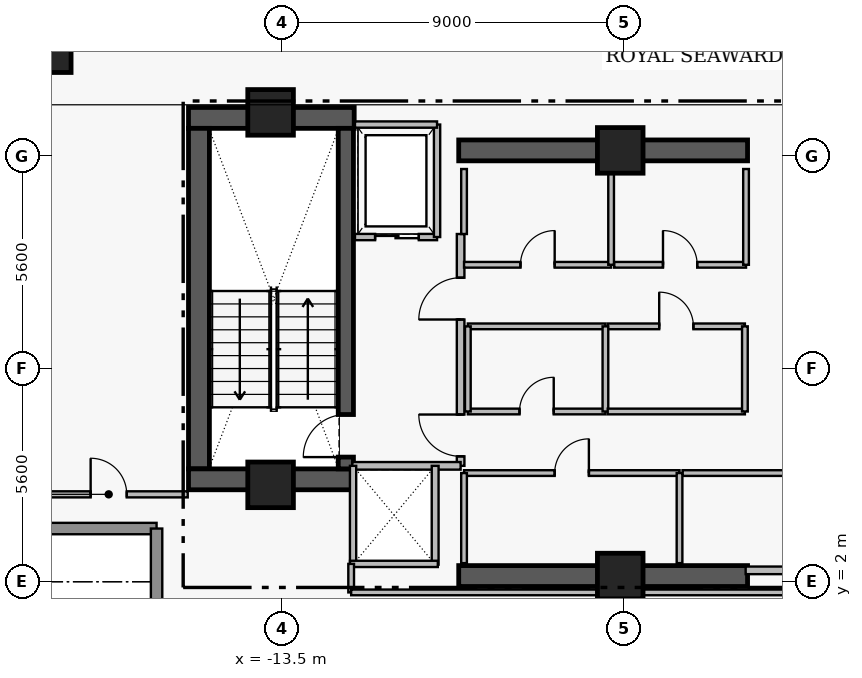
"""IFC4 building model, lengths in metres.
Left out: names, types, materials, properties, quantities, classifications, styles, units other than length and angle.
Written with IfcOpenShell. Run it as: python <this file> out.ifc"""

import sys

from ifc_helpers import new_model, si_unit, direction, frame, frame_2d, origin, origin_2d, place, context, subcontext, project, spatial, rectangle, extrude, element, fill, save


model = new_model("IFC4")
c1 = context("Model", 3, precision=1e-05, world=origin(), true_north=direction((0.0, 1.0)))
c2 = subcontext(c1, "Body", "Model", "MODEL_VIEW")
j1 = project(units=[si_unit("LENGTHUNIT", "METRE"), si_unit("PLANEANGLEUNIT", "RADIAN")], contexts=[c1])
p1 = place(None, origin())
s1 = spatial("IfcSite", under=j1, at=p1, CompositionType="ELEMENT")
p2 = place(p1, origin())
s2 = spatial("IfcBuilding", under=s1, at=p2, CompositionType="ELEMENT")
p3 = place(p2, frame((0.0, 0.0, 265.55)))
s3 = spatial("IfcBuildingStorey", under=s2, at=p3, CompositionType="ELEMENT", Elevation=265.55)
p4 = place(p3, frame((-15.96, 14.205, 0.0), z_axis=(0.0, 0.0, 1.0), x_axis=(1.0, 0.0, 0.0)))
e1 = element("IfcWall", 1, at=p4, inside=s3, PredefinedType="SHEAR", context=c2, shape_type="SweptSolid", body=[
    extrude(rectangle(XDim=4.36, YDim=0.55, at=frame_2d((2.18, 0.0))), origin(), (0.0, 0.0, 1.0), 3.51),
])
p5 = place(p3, frame((-15.685, 4.97, 0.0), z_axis=(0.0, 0.0, 1.0), x_axis=(0.0, 1.0, 0.0)))
e2 = element("IfcWall", 2, at=p5, inside=s3, PredefinedType="SHEAR", context=c2, shape_type="SweptSolid", body=[
    extrude(rectangle(XDim=8.96, YDim=0.55, at=frame_2d((4.48, 0.0))), origin(), (0.0, 0.0, 1.0), 3.51),
])
p6 = place(p3, frame((-15.96, 4.695, 0.0), z_axis=(0.0, 0.0, 1.0), x_axis=(1.0, 0.0, 0.0)))
e3 = element("IfcWall", 3, at=p6, inside=s3, PredefinedType="SHEAR", context=c2, shape_type="SweptSolid", body=[
    extrude(rectangle(XDim=4.36, YDim=0.55, at=frame_2d((2.18, 0.0))), origin(), (0.0, 0.0, 1.0), 3.51),
])
for number, where, z_axis, x_axis in (
    (4, (-8.85, 2.15, 0.0), (0.0, 0.0, 1.0), (1.0, 0.0, 0.0)),
    (5, (-8.85, 13.35, 0.0), (0.0, 0.0, 1.0), (1.0, 0.0, 0.0)),
):
    element("IfcWall", number, at=place(p3, frame(where, z_axis=z_axis, x_axis=x_axis)), inside=s3, PredefinedType="SHEAR", context=c2, shape_type="SweptSolid", body=[
        extrude(rectangle(XDim=7.6, YDim=0.55, at=frame_2d((3.8, 0.0))), origin(), (0.0, 0.0, 1.0), 3.48),
    ])
p7 = place(p3, frame((-11.82, 4.97, 0.0), z_axis=(0.0, 0.0, 1.0), x_axis=(0.0, 1.0, 0.0)))
e6 = element("IfcWall", 6, at=p7, inside=s3, PredefinedType="SHEAR", context=c2, shape_type="SweptSolid", body=[
    extrude(rectangle(XDim=8.96, YDim=0.4, at=frame_2d((4.48, 0.0))), origin(), (0.0, 0.0, 1.0), 3.51),
])
p8 = place(p7, frame((0.31, 0.0, 0.0)))
e7 = element("IfcOpeningElement", 7, at=p8, cuts=e6, PredefinedType="OPENING", context=c2, shape_type="SweptSolid", body=[
    extrude(rectangle(XDim=1.12, YDim=2.22, at=frame_2d((0.56, 1.11))), frame((0.0, 0.21, 0.0), z_axis=(0.0, -1.0, 0.0), x_axis=(1.0, 0.0, 0.0)), (0.0, 0.0, 1.0), 0.42),
])
for number, where, z_axis, x_axis in (
    (8, (-13.8, 14.35, 0.0), (0.0, 0.0, 1.0), (1.0, 0.0, 0.0)),
    (9, (-4.6, 13.35, 0.0), (0.0, 0.0, 1.0), (1.0, 0.0, 0.0)),
    (10, (-13.8, 4.55, 0.0), (0.0, 0.0, 1.0), (1.0, 0.0, 0.0)),
    (11, (-4.6, 2.15, 0.0), (0.0, 0.0, 1.0), (1.0, 0.0, 0.0)),
):
    element("IfcColumn", number, at=place(p3, frame(where, z_axis=z_axis, x_axis=x_axis)), inside=s3, PredefinedType="COLUMN", context=c2, shape_type="SweptSolid", body=[
        extrude(rectangle(XDim=1.2, YDim=1.2, at=origin_2d()), origin(), (0.0, 0.0, 1.0), 3.7),
    ])
p9 = place(p3, frame((-19.55, 15.9, 0.0), z_axis=(0.0, 0.0, 1.0), x_axis=(1.0, 0.0, 0.0)))
e12 = element("IfcColumn", 12, at=p9, inside=s3, PredefinedType="COLUMN", context=c2, shape_type="SweptSolid", body=[
    extrude(rectangle(XDim=1.0, YDim=1.0, at=origin_2d()), origin(), (0.0, 0.0, 1.0), 3.7),
])
for number, where, z_axis, x_axis in (
    (13, (-16.8, 3.4, 0.0), (0.0, 0.0, 1.0), (-1.0, 0.0, 0.0)),
    (14, (-16.8, 0.0, 0.0), (0.0, 0.0, 1.0), (0.0, 1.0, 0.0)),
):
    element("IfcWall", number, at=place(p3, frame(where, z_axis=z_axis, x_axis=x_axis)), inside=s3, PredefinedType="STANDARD", context=c2, shape_type="SweptSolid", body=[
        extrude(rectangle(XDim=3.4, YDim=0.3, at=frame_2d((1.7, 0.0))), origin(), (0.0, 0.0, 1.0), 3.48),
    ])
p10 = place(p3, frame((-8.8, 5.05, 0.0), z_axis=(0.0, 0.0, 1.0), x_axis=(0.0, 1.0, 0.0)))
e15 = element("IfcWall", 15, at=p10, inside=s3, PredefinedType="PARTITIONING", context=c2, shape_type="SweptSolid", body=[
    extrude(rectangle(XDim=6.1, YDim=0.2, at=frame_2d((3.05, 0.0))), origin(), (0.0, 0.0, 1.0), 3.48),
])
p11 = place(p10, frame((0.25, 0.0, 0.0)))
e16 = element("IfcOpeningElement", 16, at=p11, cuts=e15, PredefinedType="OPENING", context=c2, shape_type="SweptSolid", body=[
    extrude(rectangle(XDim=1.1, YDim=2.2, at=frame_2d((0.55, 1.1))), frame((0.0, 0.11, 0.0), z_axis=(0.0, -1.0, 0.0), x_axis=(1.0, 0.0, 0.0)), (0.0, 0.0, 1.0), 0.22),
])
p12 = place(p10, frame((3.85, 0.0, 0.0)))
e17 = element("IfcOpeningElement", 17, at=p12, cuts=e15, PredefinedType="OPENING", context=c2, shape_type="SweptSolid", body=[
    extrude(rectangle(XDim=1.1, YDim=2.2, at=frame_2d((0.55, 1.1))), frame((0.0, 0.11, 0.0), z_axis=(0.0, -1.0, 0.0), x_axis=(1.0, 0.0, 0.0)), (0.0, 0.0, 1.0), 0.22),
])
p13 = place(p3, frame((-11.58, 11.07, 0.0), z_axis=(0.0, 0.0, 1.0), x_axis=(1.0, 0.0, 0.0)))
e18 = element("IfcWall", 18, at=p13, inside=s3, PredefinedType="PARTITIONING", context=c2, shape_type="SweptSolid", body=[
    extrude(rectangle(XDim=2.16, YDim=0.165, at=frame_2d((1.08, 0.0))), origin(), (0.0, 0.0, 1.0), 3.48),
])
p14 = place(p13, frame((0.53, 0.0, 0.0)))
e19 = element("IfcOpeningElement", 19, at=p14, cuts=e18, PredefinedType="OPENING", context=c2, shape_type="SweptSolid", body=[
    extrude(rectangle(XDim=1.15, YDim=2.25, at=frame_2d((0.575, 1.125))), frame((0.0, 0.093, 0.0), z_axis=(0.0, -1.0, 0.0), x_axis=(1.0, 0.0, 0.0)), (0.0, 0.0, 1.0), 0.185),
])
p15 = place(p3, frame((-8.71, 4.86, 0.0), z_axis=(0.0, 0.0, 1.0), x_axis=(1.0, 0.0, 0.0)))
e20 = element("IfcWall", 20, at=p15, inside=s3, PredefinedType="PARTITIONING", context=c2, shape_type="SweptSolid", body=[
    extrude(rectangle(XDim=5.67, YDim=0.15, at=frame_2d((2.835, 0.0))), origin(), (0.0, 0.0, 1.0), 3.48),
])
p16 = place(p15, frame((2.385, 0.0, 0.0)))
e21 = element("IfcOpeningElement", 21, at=p16, cuts=e20, PredefinedType="OPENING", context=c2, shape_type="SweptSolid", body=[
    extrude(rectangle(XDim=0.9, YDim=2.15, at=frame_2d((0.45, 1.075))), frame((0.0, 0.085, 0.0), z_axis=(0.0, -1.0, 0.0), x_axis=(1.0, 0.0, 0.0)), (0.0, 0.0, 1.0), 0.17),
])
p17 = place(p3, frame((-2.96, 4.86, 0.0), z_axis=(0.0, 0.0, 1.0), x_axis=(1.0, 0.0, 0.0)))
e22 = element("IfcWall", 22, at=p17, inside=s3, PredefinedType="PARTITIONING", context=c2, shape_type="SweptSolid", body=[
    extrude(rectangle(XDim=6.67, YDim=0.15, at=frame_2d((3.335, 0.0))), origin(), (0.0, 0.0, 1.0), 3.48),
])
p18 = place(p17, frame((2.885, 0.0, 0.0)))
e23 = element("IfcOpeningElement", 23, at=p18, cuts=e22, PredefinedType="OPENING", context=c2, shape_type="SweptSolid", body=[
    extrude(rectangle(XDim=0.9, YDim=2.15, at=frame_2d((0.45, 1.075))), frame((0.0, 0.085, 0.0), z_axis=(0.0, -1.0, 0.0), x_axis=(1.0, 0.0, 0.0)), (0.0, 0.0, 1.0), 0.17),
])
p19 = place(p3, frame((-8.71, 10.34, 0.0), z_axis=(0.0, 0.0, 1.0), x_axis=(1.0, 0.0, 0.0)))
e24 = element("IfcWall", 24, at=p19, inside=s3, PredefinedType="PARTITIONING", context=c2, shape_type="SweptSolid", body=[
    extrude(rectangle(XDim=3.87, YDim=0.15, at=frame_2d((1.935, 0.0))), origin(), (0.0, 0.0, 1.0), 3.48),
])
p20 = place(p19, frame((1.485, 0.0, 0.0)))
e25 = element("IfcOpeningElement", 25, at=p20, cuts=e24, PredefinedType="OPENING", context=c2, shape_type="SweptSolid", body=[
    extrude(rectangle(XDim=0.9, YDim=2.15, at=frame_2d((0.45, 1.075))), frame((0.0, 0.085, 0.0), z_axis=(0.0, -1.0, 0.0), x_axis=(1.0, 0.0, 0.0)), (0.0, 0.0, 1.0), 0.17),
])
p21 = place(p3, frame((-4.76, 10.34, 0.0), z_axis=(0.0, 0.0, 1.0), x_axis=(1.0, 0.0, 0.0)))
e26 = element("IfcWall", 26, at=p21, inside=s3, PredefinedType="PARTITIONING", context=c2, shape_type="SweptSolid", body=[
    extrude(rectangle(XDim=3.47, YDim=0.15, at=frame_2d((1.735, 0.0))), origin(), (0.0, 0.0, 1.0), 3.48),
])
p22 = place(p21, frame((1.285, 0.0, 0.0)))
e27 = element("IfcOpeningElement", 27, at=p22, cuts=e26, PredefinedType="OPENING", context=c2, shape_type="SweptSolid", body=[
    extrude(rectangle(XDim=0.9, YDim=2.15, at=frame_2d((0.45, 1.075))), frame((0.0, 0.085, 0.0), z_axis=(0.0, -1.0, 0.0), x_axis=(1.0, 0.0, 0.0)), (0.0, 0.0, 1.0), 0.17),
])
p23 = place(p3, frame((-8.61, 6.48, 0.0), z_axis=(0.0, 0.0, 1.0), x_axis=(1.0, 0.0, 0.0)))
e28 = element("IfcWall", 28, at=p23, inside=s3, PredefinedType="PARTITIONING", context=c2, shape_type="SweptSolid", body=[
    extrude(rectangle(XDim=3.62, YDim=0.15, at=frame_2d((1.81, 0.0))), origin(), (0.0, 0.0, 1.0), 3.48),
])
p24 = place(p23, frame((1.36, 0.0, 0.0)))
e29 = element("IfcOpeningElement", 29, at=p24, cuts=e28, PredefinedType="OPENING", context=c2, shape_type="SweptSolid", body=[
    extrude(rectangle(XDim=0.9, YDim=2.15, at=frame_2d((0.45, 1.075))), frame((0.0, 0.085, 0.0), z_axis=(0.0, -1.0, 0.0), x_axis=(1.0, 0.0, 0.0)), (0.0, 0.0, 1.0), 0.17),
])
p25 = place(p3, frame((-4.93, 8.72, 0.0), z_axis=(0.0, 0.0, 1.0), x_axis=(1.0, 0.0, 0.0)))
e30 = element("IfcWall", 30, at=p25, inside=s3, PredefinedType="PARTITIONING", context=c2, shape_type="SweptSolid", body=[
    extrude(rectangle(XDim=3.61, YDim=0.15, at=frame_2d((1.805, 0.0))), origin(), (0.0, 0.0, 1.0), 3.48),
])
p26 = place(p25, frame((1.355, 0.0, 0.0)))
e31 = element("IfcOpeningElement", 31, at=p26, cuts=e30, PredefinedType="OPENING", context=c2, shape_type="SweptSolid", body=[
    extrude(rectangle(XDim=0.9, YDim=2.15, at=frame_2d((0.45, 1.075))), frame((0.0, 0.085, 0.0), z_axis=(0.0, -1.0, 0.0), x_axis=(1.0, 0.0, 0.0)), (0.0, 0.0, 1.0), 0.17),
])
p27 = place(p3, frame((-20.14, 4.3, 0.0), z_axis=(0.0, 0.0, 1.0), x_axis=(1.0, 0.0, 0.0)))
e32 = element("IfcWall", 32, at=p27, inside=s3, PredefinedType="PARTITIONING", context=c2, shape_type="SweptSolid", body=[
    extrude(rectangle(XDim=4.16, YDim=0.16, at=frame_2d((2.08, 0.0))), origin(), (0.0, 0.0, 1.0), 3.48),
])
p28 = place(p27, frame((1.605, 0.0, 0.0)))
e33 = element("IfcOpeningElement", 33, at=p28, cuts=e32, PredefinedType="OPENING", context=c2, shape_type="SweptSolid", body=[
    extrude(rectangle(XDim=0.95, YDim=2.15, at=frame_2d((0.475, 1.075))), frame((0.0, 0.09, 0.0), z_axis=(0.0, -1.0, 0.0), x_axis=(1.0, 0.0, 0.0)), (0.0, 0.0, 1.0), 0.18),
])
p29 = place(p3, frame((-11.65, 5.05, 0.0), z_axis=(0.0, 0.0, 1.0), x_axis=(1.0, 0.0, 0.0)))
e34 = element("IfcWall", 34, at=p29, inside=s3, PredefinedType="PARTITIONING", context=c2, shape_type="SweptSolid", body=[
    extrude(rectangle(XDim=2.85, YDim=0.2, at=frame_2d((1.425, 0.0))), origin(), (0.0, 0.0, 1.0), 3.48),
])
p30 = place(p3, frame((-9.42, 11.07, 0.0), z_axis=(0.0, 0.0, 1.0), x_axis=(0.0, 1.0, 0.0)))
e35 = element("IfcWall", 35, at=p30, inside=s3, PredefinedType="PARTITIONING", context=c2, shape_type="SweptSolid", body=[
    extrude(rectangle(XDim=2.96, YDim=0.165, at=frame_2d((1.48, 0.0))), origin(), (0.0, 0.0, 1.0), 3.48),
])
p31 = place(p3, frame((-11.58, 14.03, 0.0), z_axis=(0.0, 0.0, 1.0), x_axis=(1.0, 0.0, 0.0)))
e36 = element("IfcWall", 36, at=p31, inside=s3, PredefinedType="PARTITIONING", context=c2, shape_type="SweptSolid", body=[
    extrude(rectangle(XDim=2.16, YDim=0.165, at=frame_2d((1.08, 0.0))), origin(), (0.0, 0.0, 1.0), 3.48),
])
p32 = place(p3, frame((-1.3, 2.3, 0.0), z_axis=(0.0, 0.0, 1.0), x_axis=(1.0, 0.0, 0.0)))
e37 = element("IfcWall", 37, at=p32, inside=s3, PredefinedType="PARTITIONING", context=c2, shape_type="SweptSolid", body=[
    extrude(rectangle(XDim=2.6, YDim=0.2, at=frame_2d((1.3, 0.0))), origin(), (0.0, 0.0, 1.0), 2.38),
])
for number, where, z_axis, x_axis in (
    (38, (-8.71, 2.49, 0.0), (0.0, 0.0, 1.0), (0.0, 1.0, 0.0)),
    (39, (-3.04, 2.49, 0.0), (0.0, 0.0, 1.0), (0.0, 1.0, 0.0)),
):
    element("IfcWall", number, at=place(p3, frame(where, z_axis=z_axis, x_axis=x_axis)), inside=s3, PredefinedType="PARTITIONING", context=c2, shape_type="SweptSolid", body=[
        extrude(rectangle(XDim=2.37, YDim=0.15, at=frame_2d((1.185, 0.0))), origin(), (0.0, 0.0, 1.0), 3.48),
    ])
p33 = place(p3, frame((-8.71, 11.15, 0.0), z_axis=(0.0, 0.0, 1.0), x_axis=(0.0, 1.0, 0.0)))
e40 = element("IfcWall", 40, at=p33, inside=s3, PredefinedType="PARTITIONING", context=c2, shape_type="SweptSolid", body=[
    extrude(rectangle(XDim=1.71, YDim=0.15, at=frame_2d((0.855, 0.0))), origin(), (0.0, 0.0, 1.0), 3.48),
])
for number, where, z_axis, x_axis in (
    (41, (-4.84, 10.34, 0.0), (0.0, 0.0, 1.0), (0.0, 1.0, 0.0)),
    (42, (-1.29, 10.34, 0.0), (0.0, 0.0, 1.0), (0.0, 1.0, 0.0)),
):
    element("IfcWall", number, at=place(p3, frame(where, z_axis=z_axis, x_axis=x_axis)), inside=s3, PredefinedType="PARTITIONING", context=c2, shape_type="SweptSolid", body=[
        extrude(rectangle(XDim=2.52, YDim=0.15, at=frame_2d((1.26, 0.0))), origin(), (0.0, 0.0, 1.0), 3.48),
    ])
p34 = place(p3, frame((-9.47, 2.45, 0.0), z_axis=(0.0, 0.0, 1.0), x_axis=(0.0, 1.0, 0.0)))
e43 = element("IfcWall", 43, at=p34, inside=s3, PredefinedType="PARTITIONING", context=c2, shape_type="SweptSolid", body=[
    extrude(rectangle(XDim=2.6, YDim=0.18, at=frame_2d((1.3, 0.0))), origin(), (0.0, 0.0, 1.0), 3.48),
])
p35 = place(p3, frame((-11.63, 2.47, 0.0), z_axis=(0.0, 0.0, 1.0), x_axis=(0.0, 1.0, 0.0)))
e44 = element("IfcWall", 44, at=p35, inside=s3, PredefinedType="PARTITIONING", context=c2, shape_type="SweptSolid", body=[
    extrude(rectangle(XDim=2.58, YDim=0.165, at=frame_2d((1.29, 0.0))), origin(), (0.0, 0.0, 1.0), 3.48),
])
p36 = place(p3, frame((-11.71, 2.47, 0.0), z_axis=(0.0, 0.0, 1.0), x_axis=(1.0, 0.0, 0.0)))
e45 = element("IfcWall", 45, at=p36, inside=s3, PredefinedType="PARTITIONING", context=c2, shape_type="SweptSolid", body=[
    extrude(rectangle(XDim=2.31, YDim=0.165, at=frame_2d((1.155, 0.0))), origin(), (0.0, 0.0, 1.0), 2.38),
])
p37 = place(p3, frame((-8.61, 8.72, 0.0), z_axis=(0.0, 0.0, 1.0), x_axis=(1.0, 0.0, 0.0)))
e46 = element("IfcWall", 46, at=p37, inside=s3, PredefinedType="PARTITIONING", context=c2, shape_type="SweptSolid", body=[
    extrude(rectangle(XDim=3.62, YDim=0.15, at=frame_2d((1.81, 0.0))), origin(), (0.0, 0.0, 1.0), 3.48),
])
for number, where, z_axis, x_axis in (
    (47, (-8.61, 6.48, 0.0), (0.0, 0.0, 1.0), (0.0, 1.0, 0.0)),
    (48, (-4.99, 6.48, 0.0), (0.0, 0.0, 1.0), (0.0, 1.0, 0.0)),
):
    element("IfcWall", number, at=place(p3, frame(where, z_axis=z_axis, x_axis=x_axis)), inside=s3, PredefinedType="PARTITIONING", context=c2, shape_type="SweptSolid", body=[
        extrude(rectangle(XDim=2.24, YDim=0.15, at=frame_2d((1.12, 0.0))), origin(), (0.0, 0.0, 1.0), 3.48),
    ])
p38 = place(p3, frame((-4.93, 6.48, 0.0), z_axis=(0.0, 0.0, 1.0), x_axis=(1.0, 0.0, 0.0)))
e49 = element("IfcWall", 49, at=p38, inside=s3, PredefinedType="PARTITIONING", context=c2, shape_type="SweptSolid", body=[
    extrude(rectangle(XDim=3.61, YDim=0.15, at=frame_2d((1.805, 0.0))), origin(), (0.0, 0.0, 1.0), 3.48),
])
p39 = place(p3, frame((-1.32, 6.48, 0.0), z_axis=(0.0, 0.0, 1.0), x_axis=(0.0, 1.0, 0.0)))
e50 = element("IfcWall", 50, at=p39, inside=s3, PredefinedType="PARTITIONING", context=c2, shape_type="SweptSolid", body=[
    extrude(rectangle(XDim=2.24, YDim=0.15, at=frame_2d((1.12, 0.0))), origin(), (0.0, 0.0, 1.0), 3.48),
])
p40 = place(p3, frame((-11.68, 1.72, 0.0), z_axis=(0.0, 0.0, 1.0), x_axis=(0.0, 1.0, 0.0)))
e51 = element("IfcWall", 51, at=p40, inside=s3, PredefinedType="PARTITIONING", context=c2, shape_type="SweptSolid", body=[
    extrude(rectangle(XDim=0.75, YDim=0.15, at=frame_2d((0.375, 0.0))), origin(), (0.0, 0.0, 1.0), 3.48),
])
p41 = place(p3, frame((-11.68, 1.72, 0.0), z_axis=(0.0, 0.0, 1.0), x_axis=(1.0, 0.0, 0.0)))
e52 = element("IfcWall", 52, at=p41, inside=s3, PredefinedType="PARTITIONING", context=c2, shape_type="SweptSolid", body=[
    extrude(rectangle(XDim=11.68, YDim=0.15, at=frame_2d((5.84, 0.0))), origin(), (0.0, 0.0, 1.0), 2.38),
])
p42 = place(p8, origin())
e53 = element("IfcDoor", 53, at=p42, inside=s3, OperationType="SINGLE_SWING_LEFT", PredefinedType="DOOR", context=c2, shape_type="SweptSolid", body=[
    extrude(rectangle(XDim=1.12, YDim=2.22, at=frame_2d((0.56, 1.11))), frame((0.0, 0.025, 0.0), z_axis=(0.0, -1.0, 0.0), x_axis=(1.0, 0.0, 0.0)), (0.0, 0.0, 1.0), 0.05),
])
fill(e7, e53)
p43 = place(p11, origin())
e54 = element("IfcDoor", 54, at=p43, inside=s3, OperationType="SINGLE_SWING_RIGHT", PredefinedType="DOOR", context=c2, shape_type="SweptSolid", body=[
    extrude(rectangle(XDim=1.1, YDim=2.2, at=frame_2d((0.55, 1.1))), frame((0.0, 0.025, 0.0), z_axis=(0.0, -1.0, 0.0), x_axis=(1.0, 0.0, 0.0)), (0.0, 0.0, 1.0), 0.05),
])
fill(e16, e54)
p44 = place(p12, origin())
e55 = element("IfcDoor", 55, at=p44, inside=s3, OperationType="SINGLE_SWING_LEFT", PredefinedType="DOOR", context=c2, shape_type="SweptSolid", body=[
    extrude(rectangle(XDim=1.1, YDim=2.2, at=frame_2d((0.55, 1.1))), frame((0.0, 0.025, 0.0), z_axis=(0.0, -1.0, 0.0), x_axis=(1.0, 0.0, 0.0)), (0.0, 0.0, 1.0), 0.05),
])
fill(e17, e55)
p45 = place(p14, origin())
e56 = element("IfcDoor", 56, at=p45, inside=s3, OperationType="SLIDING_TO_LEFT", PredefinedType="DOOR", context=c2, shape_type="SweptSolid", body=[
    extrude(rectangle(XDim=1.15, YDim=2.25, at=frame_2d((0.575, 1.125))), frame((0.0, 0.025, 0.0), z_axis=(0.0, -1.0, 0.0), x_axis=(1.0, 0.0, 0.0)), (0.0, 0.0, 1.0), 0.05),
])
fill(e19, e56)
p46 = place(p16, origin())
e57 = element("IfcDoor", 57, at=p46, inside=s3, OperationType="SINGLE_SWING_RIGHT", PredefinedType="DOOR", context=c2, shape_type="SweptSolid", body=[
    extrude(rectangle(XDim=0.9, YDim=2.15, at=frame_2d((0.45, 1.075))), frame((0.0, 0.025, 0.0), z_axis=(0.0, -1.0, 0.0), x_axis=(1.0, 0.0, 0.0)), (0.0, 0.0, 1.0), 0.05),
])
fill(e21, e57)
p47 = place(p20, origin())
e58 = element("IfcDoor", 58, at=p47, inside=s3, OperationType="SINGLE_SWING_RIGHT", PredefinedType="DOOR", context=c2, shape_type="SweptSolid", body=[
    extrude(rectangle(XDim=0.9, YDim=2.15, at=frame_2d((0.45, 1.075))), frame((0.0, 0.025, 0.0), z_axis=(0.0, -1.0, 0.0), x_axis=(1.0, 0.0, 0.0)), (0.0, 0.0, 1.0), 0.05),
])
fill(e25, e58)
p48 = place(p22, origin())
e59 = element("IfcDoor", 59, at=p48, inside=s3, OperationType="SINGLE_SWING_LEFT", PredefinedType="DOOR", context=c2, shape_type="SweptSolid", body=[
    extrude(rectangle(XDim=0.9, YDim=2.15, at=frame_2d((0.45, 1.075))), frame((0.0, 0.025, 0.0), z_axis=(0.0, -1.0, 0.0), x_axis=(1.0, 0.0, 0.0)), (0.0, 0.0, 1.0), 0.05),
])
fill(e27, e59)
p49 = place(p24, origin())
e60 = element("IfcDoor", 60, at=p49, inside=s3, OperationType="SINGLE_SWING_RIGHT", PredefinedType="DOOR", context=c2, shape_type="SweptSolid", body=[
    extrude(rectangle(XDim=0.9, YDim=2.15, at=frame_2d((0.45, 1.075))), frame((0.0, 0.025, 0.0), z_axis=(0.0, -1.0, 0.0), x_axis=(1.0, 0.0, 0.0)), (0.0, 0.0, 1.0), 0.05),
])
fill(e29, e60)
p50 = place(p26, origin())
e61 = element("IfcDoor", 61, at=p50, inside=s3, OperationType="SINGLE_SWING_LEFT", PredefinedType="DOOR", context=c2, shape_type="SweptSolid", body=[
    extrude(rectangle(XDim=0.9, YDim=2.15, at=frame_2d((0.45, 1.075))), frame((0.0, 0.025, 0.0), z_axis=(0.0, -1.0, 0.0), x_axis=(1.0, 0.0, 0.0)), (0.0, 0.0, 1.0), 0.05),
])
fill(e31, e61)
p51 = place(p28, origin())
e62 = element("IfcDoor", 62, at=p51, inside=s3, OperationType="SINGLE_SWING_LEFT", PredefinedType="DOOR", context=c2, shape_type="SweptSolid", body=[
    extrude(rectangle(XDim=0.95, YDim=2.15, at=frame_2d((0.475, 1.075))), frame((0.0, 0.025, 0.0), z_axis=(0.0, -1.0, 0.0), x_axis=(1.0, 0.0, 0.0)), (0.0, 0.0, 1.0), 0.05),
])
fill(e33, e62)
save(model, sys.argv[1])
